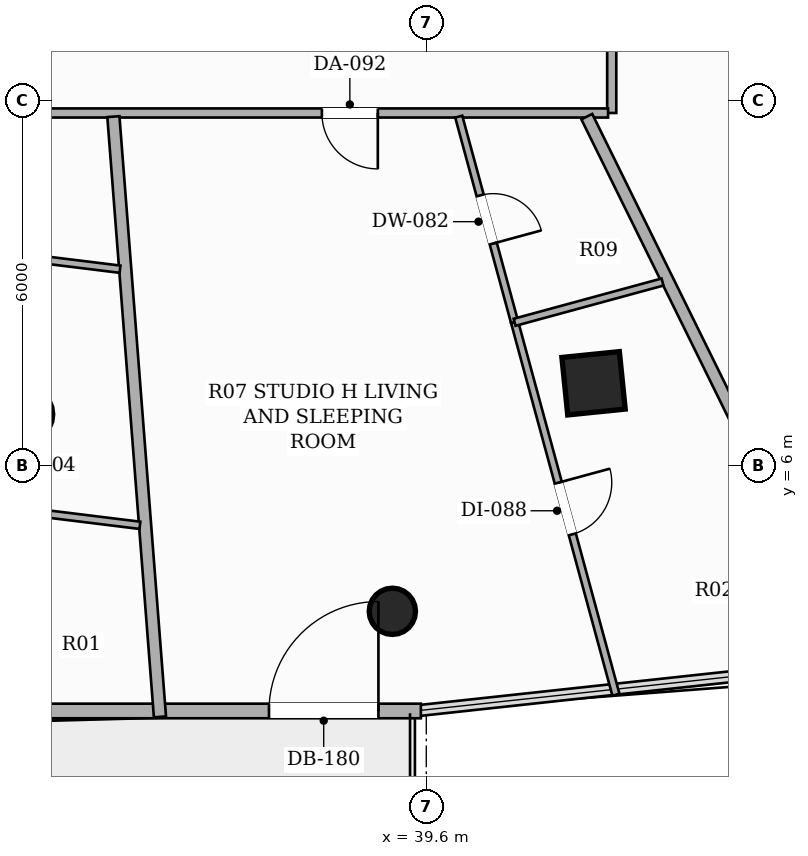
"""IFC4 building model, lengths in metres.
Left out: names, types, materials, properties, quantities, classifications, styles, units other than length and angle.
Written with IfcOpenShell. Run it as: python <this file> out.ifc"""

import sys

from ifc_helpers import new_model, si_unit, direction, frame, frame_2d, origin, origin_2d, place, context, subcontext, project, spatial, rectangle, hollow_rectangle, hollow_circle, extrude, element, fill, save


model = new_model("IFC4")
c1 = context("Model", 3, precision=1e-05, world=origin(), true_north=direction((0.0, 1.0)))
c2 = subcontext(c1, "Body", "Model", "MODEL_VIEW")
j1 = project(units=[si_unit("LENGTHUNIT", "METRE"), si_unit("PLANEANGLEUNIT", "RADIAN")], contexts=[c1])
p1 = place(None, origin())
s1 = spatial("IfcSite", under=j1, at=p1, CompositionType="ELEMENT")
p2 = place(p1, origin())
s2 = spatial("IfcBuilding", under=s1, at=p2, CompositionType="ELEMENT")
p3 = place(p2, frame((0.0, 0.0, 64.25)))
s3 = spatial("IfcBuildingStorey", under=s2, at=p3, CompositionType="ELEMENT", Elevation=64.25)
p4 = place(p3, frame((33.0, 6.844, 0.0), z_axis=(0.0, 0.0, 1.0), x_axis=(1.0, 0.0, 0.0)))
e1 = element("IfcColumn", 1, at=p4, inside=s3, PredefinedType="COLUMN", context=c2, shape_type="SweptSolid", body=[
    extrude(hollow_circle(Radius=0.457, WallThickness=0.025, at=origin_2d()), origin(), (0.0, 0.0, 1.0), 3.3),
])
p5 = place(p3, frame((42.351, 7.355, 0.0), z_axis=(0.0, 0.0, 1.0), x_axis=(0.994880708829, 0.101056297183, 0.0)))
e2 = element("IfcColumn", 2, at=p5, inside=s3, PredefinedType="COLUMN", context=c2, shape_type="SweptSolid", body=[
    extrude(hollow_rectangle(XDim=0.95, YDim=0.95, WallThickness=0.032, at=origin_2d()), origin(), (0.0, 0.0, 1.0), 3.3),
])
p6 = place(p3, frame((39.042, 3.605, 0.0), z_axis=(0.0, 0.0, 1.0), x_axis=(1.0, 0.0, 0.0)))
e3 = element("IfcColumn", 3, at=p6, inside=s3, PredefinedType="COLUMN", context=c2, shape_type="SweptSolid", body=[
    extrude(hollow_circle(Radius=0.381, WallThickness=0.022, at=origin_2d()), origin(), (0.0, 0.0, 1.0), 3.3),
])
p7 = place(p3, frame((26.489, 1.966, 0.0), z_axis=(0.0, 0.0, 1.0), x_axis=(1.0, 0.0, 0.0)))
e4 = element("IfcWall", 4, at=p7, inside=s3, PredefinedType="SOLIDWALL", context=c2, shape_type="SweptSolid", body=[
    extrude(rectangle(XDim=13.022, YDim=0.24, at=frame_2d((6.511, 0.0))), origin(), (0.0, 0.0, 1.0), 2.624),
])
p8 = place(p7, frame((10.524, 0.0, 0.0)))
e5 = element("IfcOpeningElement", 5, at=p8, cuts=e4, PredefinedType="OPENING", context=c2, shape_type="SweptSolid", body=[
    extrude(rectangle(XDim=1.8, YDim=2.2, at=frame_2d((0.9, 1.1))), frame((0.0, 0.13, 0.0), z_axis=(0.0, -1.0, 0.0), x_axis=(1.0, 0.0, 0.0)), (0.0, 0.0, 1.0), 0.26),
])
p9 = place(p3, frame((42.65, 36.84, 0.0), z_axis=(0.0, 0.0, 1.0), x_axis=(0.0, -1.0, 0.0)))
e6 = element("IfcWall", 6, at=p9, inside=s3, PredefinedType="PARTITIONING", context=c2, shape_type="SweptSolid", body=[
    extrude(rectangle(XDim=25.04, YDim=0.15, at=frame_2d((12.52, 0.0))), origin(), (0.0, 0.0, 1.0), 2.413),
])
p10 = place(p9, frame((6.577, 0.0, 0.0)))
e7 = element("IfcOpeningElement", 7, at=p10, cuts=e6, PredefinedType="OPENING", context=c2, shape_type="SweptSolid", body=[
    extrude(rectangle(XDim=0.92, YDim=2.15, at=frame_2d((0.46, 1.075))), frame((0.0, 0.085, 0.0), z_axis=(0.0, -1.0, 0.0), x_axis=(1.0, 0.0, 0.0)), (0.0, 0.0, 1.0), 0.17),
])
p11 = place(p9, frame((19.777, 0.0, 0.0)))
e8 = element("IfcOpeningElement", 8, at=p11, cuts=e6, PredefinedType="OPENING", context=c2, shape_type="SweptSolid", body=[
    extrude(rectangle(XDim=0.88, YDim=2.1, at=frame_2d((0.44, 1.05))), frame((0.0, 0.085, 0.0), z_axis=(0.0, -1.0, 0.0), x_axis=(1.0, 0.0, 0.0)), (0.0, 0.0, 1.0), 0.17),
])
p12 = place(p9, frame((14.193, 0.0, 0.0)))
e9 = element("IfcOpeningElement", 9, at=p12, cuts=e6, PredefinedType="OPENING", context=c2, shape_type="SweptSolid", body=[
    extrude(rectangle(XDim=0.88, YDim=2.1, at=frame_2d((0.44, 1.05))), frame((0.0, 0.085, 0.0), z_axis=(0.0, -1.0, 0.0), x_axis=(1.0, 0.0, 0.0)), (0.0, 0.0, 1.0), 0.17),
])
p13 = place(p3, frame((42.59, 11.8, 0.0), z_axis=(0.0, 0.0, 1.0), x_axis=(-1.0, 0.0, 0.0)))
e10 = element("IfcWall", 10, at=p13, inside=s3, PredefinedType="PARTITIONING", context=c2, shape_type="SweptSolid", body=[
    extrude(rectangle(XDim=19.24, YDim=0.15, at=frame_2d((9.62, 0.0))), origin(), (0.0, 0.0, 1.0), 2.669),
])
p14 = place(p13, frame((11.489, 0.0, 0.0)))
e11 = element("IfcOpeningElement", 11, at=p14, cuts=e10, PredefinedType="OPENING", context=c2, shape_type="SweptSolid", body=[
    extrude(rectangle(XDim=0.92, YDim=2.15, at=frame_2d((0.46, 1.075))), frame((0.0, 0.085, 0.0), z_axis=(0.0, -1.0, 0.0), x_axis=(1.0, 0.0, 0.0)), (0.0, 0.0, 1.0), 0.17),
])
p15 = place(p13, frame((3.787, 0.0, 0.0)))
e12 = element("IfcOpeningElement", 12, at=p15, cuts=e10, PredefinedType="OPENING", context=c2, shape_type="SweptSolid", body=[
    extrude(rectangle(XDim=0.92, YDim=2.15, at=frame_2d((0.46, 1.075))), frame((0.0, 0.085, 0.0), z_axis=(0.0, -1.0, 0.0), x_axis=(1.0, 0.0, 0.0)), (0.0, 0.0, 1.0), 0.17),
])
p16 = place(p3, frame((58.866, 12.141, 0.0), z_axis=(0.0, 0.0, 1.0), x_axis=(-0.815477500133, 0.578788775614, 0.0)))
e13 = element("IfcWall", 13, at=p16, inside=s3, PredefinedType="PARTITIONING", context=c2, shape_type="SweptSolid", body=[
    extrude(rectangle(XDim=19.812, YDim=0.2, at=frame_2d((9.906, 0.0))), origin(), (0.0, 0.0, 1.0), 2.413),
])
p17 = place(p3, frame((46.754, 2.576, 0.0), z_axis=(0.0, 0.0, 1.0), x_axis=(-0.441871352221, 0.897078429172, 0.0)))
e14 = element("IfcWall", 14, at=p17, inside=s3, PredefinedType="PARTITIONING", context=c2, shape_type="SweptSolid", body=[
    extrude(rectangle(XDim=10.215, YDim=0.2, at=frame_2d((5.108, 0.0))), origin(), (0.0, 0.0, 1.0), 2.413),
])
p18 = place(p3, frame((42.71, 21.087, 0.0), z_axis=(0.0, 0.0, 1.0), x_axis=(0.717996025824, -0.696047201633, 0.0)))
e15 = element("IfcWall", 15, at=p18, inside=s3, PredefinedType="PARTITIONING", context=c2, shape_type="SweptSolid", body=[
    extrude(rectangle(XDim=23.737, YDim=0.2, at=frame_2d((11.868, 0.0))), origin(), (0.0, 0.0, 1.0), 2.413),
])
p19 = place(p3, frame((34.454, 11.74, 0.0), z_axis=(0.0, 0.0, 1.0), x_axis=(0.077354581403, -0.997003645297, 0.0)))
e16 = element("IfcWall", 16, at=p19, inside=s3, PredefinedType="PARTITIONING", context=c2, shape_type="SweptSolid", body=[
    extrude(rectangle(XDim=9.901, YDim=0.2, at=frame_2d((4.95, 0.0))), origin(), (0.0, 0.0, 1.0), 2.413),
])
p20 = place(p3, frame((34.563, 9.231, 0.0), z_axis=(0.0, 0.0, 1.0), x_axis=(-0.992492062854, 0.122309055968, 0.0)))
e17 = element("IfcWall", 17, at=p20, inside=s3, PredefinedType="PARTITIONING", context=c2, shape_type="SweptSolid", body=[
    extrude(rectangle(XDim=2.02, YDim=0.12, at=frame_2d((1.01, 0.0))), origin(), (0.0, 0.0, 1.0), 2.669),
])
p21 = place(p3, frame((34.89, 5.019, 0.0), z_axis=(0.0, 0.0, 1.0), x_axis=(-0.992491734807, 0.12231171792, 0.0)))
e18 = element("IfcWall", 18, at=p21, inside=s3, PredefinedType="PARTITIONING", context=c2, shape_type="SweptSolid", body=[
    extrude(rectangle(XDim=2.86, YDim=0.12, at=frame_2d((1.43, 0.0))), origin(), (0.0, 0.0, 1.0), 3.06),
])
p22 = place(p3, frame((40.134, 11.74, 0.0), z_axis=(0.0, 0.0, 1.0), x_axis=(0.262203658207, -0.965012560345, 0.0)))
e19 = element("IfcWall", 19, at=p22, inside=s3, PredefinedType="PARTITIONING", context=c2, shape_type="SweptSolid", body=[
    extrude(rectangle(XDim=3.505, YDim=0.12, at=frame_2d((1.752, 0.0))), origin(), (0.0, 0.0, 1.0), 3.06),
])
p23 = place(p22, frame((1.342, 0.0, 0.0)))
e20 = element("IfcOpeningElement", 20, at=p23, cuts=e19, PredefinedType="OPENING", context=c2, shape_type="SweptSolid", body=[
    extrude(rectangle(XDim=0.82, YDim=2.1, at=frame_2d((0.41, 1.05))), frame((0.0, 0.07, 0.0), z_axis=(0.0, -1.0, 0.0), x_axis=(1.0, 0.0, 0.0)), (0.0, 0.0, 1.0), 0.14),
])
p24 = place(p3, frame((41.053, 8.358, 0.0), z_axis=(0.0, 0.0, 1.0), x_axis=(0.262466446164, -0.964941119778, 0.0)))
e21 = element("IfcWall", 21, at=p24, inside=s3, PredefinedType="PARTITIONING", context=c2, shape_type="SweptSolid", body=[
    extrude(rectangle(XDim=6.348, YDim=0.12, at=frame_2d((3.174, 0.0))), origin(), (0.0, 0.0, 1.0), 2.413),
])
p25 = place(p24, frame((2.734, 0.0, 0.0)))
e22 = element("IfcOpeningElement", 22, at=p25, cuts=e21, PredefinedType="OPENING", context=c2, shape_type="SweptSolid", body=[
    extrude(rectangle(XDim=0.88, YDim=2.1, at=frame_2d((0.44, 1.05))), frame((0.0, 0.07, 0.0), z_axis=(0.0, -1.0, 0.0), x_axis=(1.0, 0.0, 0.0)), (0.0, 0.0, 1.0), 0.14),
])
p26 = place(p3, frame((43.485, 9.02, 0.0), z_axis=(0.0, 0.0, 1.0), x_axis=(-0.964884417827, -0.262674818425, 0.0)))
e23 = element("IfcWall", 23, at=p26, inside=s3, PredefinedType="PARTITIONING", context=c2, shape_type="SweptSolid", body=[
    extrude(rectangle(XDim=2.521, YDim=0.12, at=frame_2d((1.26, 0.0))), origin(), (0.0, 0.0, 1.0), 2.669),
])
p27 = place(p8, origin())
e24 = element("IfcDoor", 24, at=p27, inside=s3, OperationType="SINGLE_SWING_RIGHT", PredefinedType="DOOR", context=c2, shape_type="SweptSolid", body=[
    extrude(rectangle(XDim=1.8, YDim=2.2, at=frame_2d((0.9, 1.1))), frame((0.0, 0.025, 0.0), z_axis=(0.0, -1.0, 0.0), x_axis=(1.0, 0.0, 0.0)), (0.0, 0.0, 1.0), 0.05),
])
fill(e5, e24)
p28 = place(p15, origin())
e25 = element("IfcDoor", 25, at=p28, inside=s3, OperationType="SINGLE_SWING_LEFT", PredefinedType="DOOR", context=c2, shape_type="SweptSolid", body=[
    extrude(rectangle(XDim=0.92, YDim=2.15, at=frame_2d((0.46, 1.075))), frame((0.0, 0.025, 0.0), z_axis=(0.0, -1.0, 0.0), x_axis=(1.0, 0.0, 0.0)), (0.0, 0.0, 1.0), 0.05),
])
fill(e12, e25)
p29 = place(p23, origin())
e26 = element("IfcDoor", 26, at=p29, inside=s3, OperationType="SINGLE_SWING_RIGHT", PredefinedType="DOOR", context=c2, shape_type="SweptSolid", body=[
    extrude(rectangle(XDim=0.82, YDim=2.1, at=frame_2d((0.41, 1.05))), frame((0.0, 0.025, 0.0), z_axis=(0.0, -1.0, 0.0), x_axis=(1.0, 0.0, 0.0)), (0.0, 0.0, 1.0), 0.05),
])
fill(e20, e26)
p30 = place(p25, origin())
e27 = element("IfcDoor", 27, at=p30, inside=s3, OperationType="SINGLE_SWING_LEFT", PredefinedType="DOOR", context=c2, shape_type="SweptSolid", body=[
    extrude(rectangle(XDim=0.88, YDim=2.1, at=frame_2d((0.44, 1.05))), frame((0.0, 0.025, 0.0), z_axis=(0.0, -1.0, 0.0), x_axis=(1.0, 0.0, 0.0)), (0.0, 0.0, 1.0), 0.05),
])
fill(e22, e27)
save(model, sys.argv[1])
